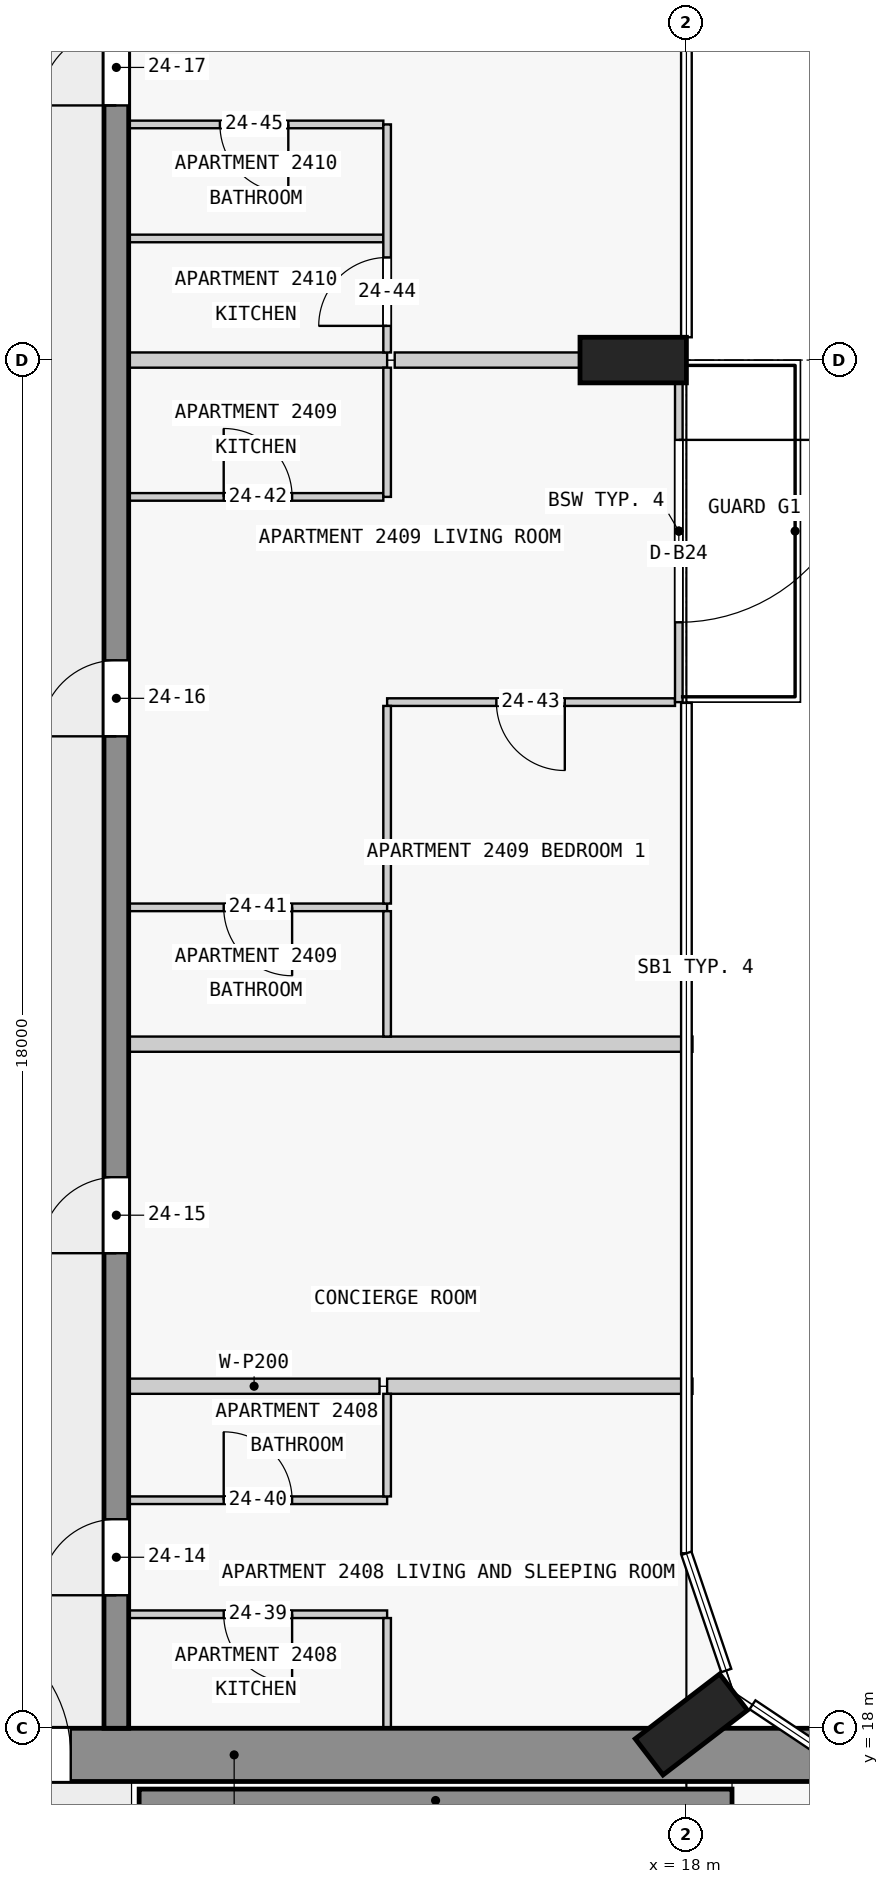
"""IFC4 building model, lengths in metres.
Left out: names, types, materials, properties, quantities, classifications, styles, units other than length and angle.
Written with IfcOpenShell. Run it as: python <this file> out.ifc"""

import sys

from ifc_helpers import new_model, si_unit, direction, frame, frame_2d, origin, origin_2d, place, context, subcontext, project, spatial, rectangle, extrude, element, fill, save


model = new_model("IFC4")
c1 = context("Model", 3, precision=1e-05, world=origin(), true_north=direction((0.0, 1.0)))
c2 = subcontext(c1, "Body", "Model", "MODEL_VIEW")
j1 = project(units=[si_unit("LENGTHUNIT", "METRE"), si_unit("PLANEANGLEUNIT", "RADIAN")], contexts=[c1])
p1 = place(None, origin())
s1 = spatial("IfcSite", under=j1, at=p1, CompositionType="ELEMENT")
p2 = place(p1, origin())
s2 = spatial("IfcBuilding", under=s1, at=p2, CompositionType="ELEMENT")
p3 = place(p2, frame((0.0, 0.0, 95.8)))
s3 = spatial("IfcBuildingStorey", under=s2, at=p3, CompositionType="ELEMENT", Elevation=95.8)
for number, where, z_axis, x_axis in (
    (1, (18.065, 18.05, 0.0), (0.0, 0.0, 1.0), (-0.609, 0.793, 0.0)),
    (2, (17.3, 36.0, 0.0), (0.0, 0.0, 1.0), (0.0, 1.0, 0.0)),
):
    element("IfcColumn", number, at=place(p3, frame(where, z_axis=z_axis, x_axis=x_axis)), inside=s3, PredefinedType="COLUMN", context=c2, shape_type="SweptSolid", body=[
        extrude(rectangle(XDim=0.6, YDim=1.4, at=origin_2d()), origin(), (0.0, 0.0, 1.0), 3.5),
    ])
p4 = place(p3, frame((1.6, 17.65, 0.0), z_axis=(0.0, 0.0, 1.0), x_axis=(1.0, 0.0, 0.0)))
e3 = element("IfcWall", 3, at=p4, inside=s3, PredefinedType="SHEAR", context=c2, shape_type="SweptSolid", body=[
    extrude(rectangle(XDim=20.9, YDim=0.7, at=frame_2d((10.45, 0.0))), origin(), (0.0, 0.0, 1.0), 3.25),
])
p5 = place(p4, frame((6.5, 0.0, 0.0)))
e4 = element("IfcOpeningElement", 4, at=p5, cuts=e3, PredefinedType="OPENING", context=c2, shape_type="SweptSolid", body=[
    extrude(rectangle(XDim=1.8, YDim=2.1, at=frame_2d((0.9, 1.05))), frame((0.0, 0.36, 0.0), z_axis=(0.0, -1.0, 0.0), x_axis=(1.0, 0.0, 0.0)), (0.0, 0.0, 1.0), 0.72),
])
p6 = place(p3, frame((10.8, 17.05, 0.0), z_axis=(0.0, 0.0, 1.0), x_axis=(1.0, 0.0, 0.0)))
e5 = element("IfcWall", 5, at=p6, inside=s3, PredefinedType="SHEAR", context=c2, shape_type="SweptSolid", body=[
    extrude(rectangle(XDim=7.8, YDim=0.3, at=frame_2d((3.9, 0.0))), origin(), (0.0, 0.0, 1.0), 3.25),
])
p7 = place(p3, frame((10.5, 18.0, 0.0), z_axis=(0.0, 0.0, 1.0), x_axis=(0.0, 1.0, 0.0)))
e6 = element("IfcWall", 6, at=p7, inside=s3, PredefinedType="SHEAR", context=c2, shape_type="SweptSolid", body=[
    extrude(rectangle(XDim=27.0, YDim=0.325, at=frame_2d((13.5, 0.0))), origin(), (0.0, 0.0, 1.0), 3.25),
])
p8 = place(p7, frame((1.75, 0.0, 0.0)))
e7 = element("IfcOpeningElement", 7, at=p8, cuts=e6, PredefinedType="OPENING", context=c2, shape_type="SweptSolid", body=[
    extrude(rectangle(XDim=1.0, YDim=2.1, at=frame_2d((0.5, 1.05))), frame((0.0, 0.172, 0.0), z_axis=(0.0, -1.0, 0.0), x_axis=(1.0, 0.0, 0.0)), (0.0, 0.0, 1.0), 0.345),
])
p9 = place(p7, frame((6.25, 0.0, 0.0)))
e8 = element("IfcOpeningElement", 8, at=p9, cuts=e6, PredefinedType="OPENING", context=c2, shape_type="SweptSolid", body=[
    extrude(rectangle(XDim=1.0, YDim=2.1, at=frame_2d((0.5, 1.05))), frame((0.0, 0.172, 0.0), z_axis=(0.0, -1.0, 0.0), x_axis=(1.0, 0.0, 0.0)), (0.0, 0.0, 1.0), 0.345),
])
p10 = place(p7, frame((13.05, 0.0, 0.0)))
e9 = element("IfcOpeningElement", 9, at=p10, cuts=e6, PredefinedType="OPENING", context=c2, shape_type="SweptSolid", body=[
    extrude(rectangle(XDim=1.0, YDim=2.1, at=frame_2d((0.5, 1.05))), frame((0.0, 0.172, 0.0), z_axis=(0.0, -1.0, 0.0), x_axis=(1.0, 0.0, 0.0)), (0.0, 0.0, 1.0), 0.345),
])
p11 = place(p7, frame((21.35, 0.0, 0.0)))
e10 = element("IfcOpeningElement", 10, at=p11, cuts=e6, PredefinedType="OPENING", context=c2, shape_type="SweptSolid", body=[
    extrude(rectangle(XDim=1.0, YDim=2.1, at=frame_2d((0.5, 1.05))), frame((0.0, 0.172, 0.0), z_axis=(0.0, -1.0, 0.0), x_axis=(1.0, 0.0, 0.0)), (0.0, 0.0, 1.0), 0.345),
])
p12 = place(p3, frame((17.9, 36.0, 0.0), z_axis=(0.0, 0.0, 1.0), x_axis=(0.0, -1.0, 0.0)))
e11 = element("IfcWall", 11, at=p12, inside=s3, PredefinedType="STANDARD", context=c2, shape_type="SweptSolid", body=[
    extrude(rectangle(XDim=4.5, YDim=0.1, at=frame_2d((2.25, 0.0))), origin(), (0.0, 0.0, 1.0), 3.25),
])
p13 = place(p12, frame((1.05, 0.0, 0.0)))
e12 = element("IfcOpeningElement", 12, at=p13, cuts=e11, PredefinedType="OPENING", context=c2, shape_type="SweptSolid", body=[
    extrude(rectangle(XDim=2.4, YDim=2.4, at=frame_2d((1.2, 1.2))), frame((0.0, 0.06, 0.0), z_axis=(0.0, -1.0, 0.0), x_axis=(1.0, 0.0, 0.0)), (0.0, 0.0, 1.0), 0.12),
])
p14 = place(p3, frame((14.062, 19.5, 0.0), z_axis=(0.0, 0.0, 1.0), x_axis=(-1.0, 0.0, 0.0)))
e13 = element("IfcWall", 13, at=p14, inside=s3, PredefinedType="PARTITIONING", context=c2, shape_type="SweptSolid", body=[
    extrude(rectangle(XDim=3.4, YDim=0.1, at=frame_2d((1.7, 0.0))), origin(), (0.0, 0.0, 1.0), 3.25),
])
p15 = place(p14, frame((1.25, 0.0, 0.0)))
e14 = element("IfcOpeningElement", 14, at=p15, cuts=e13, PredefinedType="OPENING", context=c2, shape_type="SweptSolid", body=[
    extrude(rectangle(XDim=0.9, YDim=2.1, at=frame_2d((0.45, 1.05))), frame((0.0, 0.06, 0.0), z_axis=(0.0, -1.0, 0.0), x_axis=(1.0, 0.0, 0.0)), (0.0, 0.0, 1.0), 0.12),
])
p16 = place(p3, frame((10.663, 21.0, 0.0), z_axis=(0.0, 0.0, 1.0), x_axis=(1.0, 0.0, 0.0)))
e15 = element("IfcWall", 15, at=p16, inside=s3, PredefinedType="PARTITIONING", context=c2, shape_type="SweptSolid", body=[
    extrude(rectangle(XDim=3.4, YDim=0.1, at=frame_2d((1.7, 0.0))), origin(), (0.0, 0.0, 1.0), 3.25),
])
p17 = place(p16, frame((1.25, 0.0, 0.0)))
e16 = element("IfcOpeningElement", 16, at=p17, cuts=e15, PredefinedType="OPENING", context=c2, shape_type="SweptSolid", body=[
    extrude(rectangle(XDim=0.9, YDim=2.1, at=frame_2d((0.45, 1.05))), frame((0.0, 0.06, 0.0), z_axis=(0.0, -1.0, 0.0), x_axis=(1.0, 0.0, 0.0)), (0.0, 0.0, 1.0), 0.12),
])
p18 = place(p3, frame((13.962, 22.5, 0.0), z_axis=(0.0, 0.0, 1.0), x_axis=(-1.0, 0.0, 0.0)))
e17 = element("IfcWall", 17, at=p18, inside=s3, PredefinedType="PARTITIONING", context=c2, shape_type="SweptSolid", body=[
    extrude(rectangle(XDim=3.3, YDim=0.2, at=frame_2d((1.65, 0.0))), origin(), (0.0, 0.0, 1.0), 3.25),
])
p19 = place(p3, frame((14.062, 22.5, 0.0), z_axis=(0.0, 0.0, 1.0), x_axis=(1.0, 0.0, 0.0)))
e18 = element("IfcWall", 18, at=p19, inside=s3, PredefinedType="PARTITIONING", context=c2, shape_type="SweptSolid", body=[
    extrude(rectangle(XDim=4.018, YDim=0.2, at=frame_2d((2.009, 0.0))), origin(), (0.0, 0.0, 1.0), 3.25),
])
p20 = place(p3, frame((18.08, 27.0, 0.0), z_axis=(0.0, 0.0, 1.0), x_axis=(-1.0, 0.0, 0.0)))
e19 = element("IfcWall", 19, at=p20, inside=s3, PredefinedType="PARTITIONING", context=c2, shape_type="SweptSolid", body=[
    extrude(rectangle(XDim=7.417, YDim=0.2, at=frame_2d((3.709, 0.0))), origin(), (0.0, 0.0, 1.0), 3.25),
])
p21 = place(p3, frame((14.062, 28.8, 0.0), z_axis=(0.0, 0.0, 1.0), x_axis=(-1.0, 0.0, 0.0)))
e20 = element("IfcWall", 20, at=p21, inside=s3, PredefinedType="PARTITIONING", context=c2, shape_type="SweptSolid", body=[
    extrude(rectangle(XDim=3.4, YDim=0.1, at=frame_2d((1.7, 0.0))), origin(), (0.0, 0.0, 1.0), 3.25),
])
p22 = place(p21, frame((1.25, 0.0, 0.0)))
e21 = element("IfcOpeningElement", 21, at=p22, cuts=e20, PredefinedType="OPENING", context=c2, shape_type="SweptSolid", body=[
    extrude(rectangle(XDim=0.9, YDim=2.1, at=frame_2d((0.45, 1.05))), frame((0.0, 0.06, 0.0), z_axis=(0.0, -1.0, 0.0), x_axis=(1.0, 0.0, 0.0)), (0.0, 0.0, 1.0), 0.12),
])
p23 = place(p3, frame((17.85, 31.5, 0.0), z_axis=(0.0, 0.0, 1.0), x_axis=(-1.0, 0.0, 0.0)))
e22 = element("IfcWall", 22, at=p23, inside=s3, PredefinedType="PARTITIONING", context=c2, shape_type="SweptSolid", body=[
    extrude(rectangle(XDim=3.788, YDim=0.1, at=frame_2d((1.894, 0.0))), origin(), (0.0, 0.0, 1.0), 3.25),
])
p24 = place(p23, frame((1.45, 0.0, 0.0)))
e23 = element("IfcOpeningElement", 23, at=p24, cuts=e22, PredefinedType="OPENING", context=c2, shape_type="SweptSolid", body=[
    extrude(rectangle(XDim=0.9, YDim=2.1, at=frame_2d((0.45, 1.05))), frame((0.0, 0.06, 0.0), z_axis=(0.0, -1.0, 0.0), x_axis=(1.0, 0.0, 0.0)), (0.0, 0.0, 1.0), 0.12),
])
p25 = place(p3, frame((10.663, 34.2, 0.0), z_axis=(0.0, 0.0, 1.0), x_axis=(1.0, 0.0, 0.0)))
e24 = element("IfcWall", 24, at=p25, inside=s3, PredefinedType="PARTITIONING", context=c2, shape_type="SweptSolid", body=[
    extrude(rectangle(XDim=3.35, YDim=0.1, at=frame_2d((1.675, 0.0))), origin(), (0.0, 0.0, 1.0), 3.25),
])
p26 = place(p25, frame((1.25, 0.0, 0.0)))
e25 = element("IfcOpeningElement", 25, at=p26, cuts=e24, PredefinedType="OPENING", context=c2, shape_type="SweptSolid", body=[
    extrude(rectangle(XDim=0.9, YDim=2.1, at=frame_2d((0.45, 1.05))), frame((0.0, 0.06, 0.0), z_axis=(0.0, -1.0, 0.0), x_axis=(1.0, 0.0, 0.0)), (0.0, 0.0, 1.0), 0.12),
])
p27 = place(p3, frame((14.062, 36.0, 0.0), z_axis=(0.0, 0.0, 1.0), x_axis=(-1.0, 0.0, 0.0)))
e26 = element("IfcWall", 26, at=p27, inside=s3, PredefinedType="PARTITIONING", context=c2, shape_type="SweptSolid", body=[
    extrude(rectangle(XDim=3.4, YDim=0.2, at=frame_2d((1.7, 0.0))), origin(), (0.0, 0.0, 1.0), 3.25),
])
p28 = place(p3, frame((14.163, 36.0, 0.0), z_axis=(0.0, 0.0, 1.0), x_axis=(1.0, 0.0, 0.0)))
e27 = element("IfcWall", 27, at=p28, inside=s3, PredefinedType="PARTITIONING", context=c2, shape_type="SweptSolid", body=[
    extrude(rectangle(XDim=2.438, YDim=0.2, at=frame_2d((1.219, 0.0))), origin(), (0.0, 0.0, 1.0), 3.25),
])
p29 = place(p3, frame((14.012, 37.6, 0.0), z_axis=(0.0, 0.0, 1.0), x_axis=(-1.0, 0.0, 0.0)))
e28 = element("IfcWall", 28, at=p29, inside=s3, PredefinedType="PARTITIONING", context=c2, shape_type="SweptSolid", body=[
    extrude(rectangle(XDim=3.35, YDim=0.1, at=frame_2d((1.675, 0.0))), origin(), (0.0, 0.0, 1.0), 3.25),
])
p30 = place(p3, frame((14.012, 39.1, 0.0), z_axis=(0.0, 0.0, 1.0), x_axis=(-1.0, 0.0, 0.0)))
e29 = element("IfcWall", 29, at=p30, inside=s3, PredefinedType="PARTITIONING", context=c2, shape_type="SweptSolid", body=[
    extrude(rectangle(XDim=3.35, YDim=0.1, at=frame_2d((1.675, 0.0))), origin(), (0.0, 0.0, 1.0), 3.25),
])
p31 = place(p30, frame((1.25, 0.0, 0.0)))
e30 = element("IfcOpeningElement", 30, at=p31, cuts=e29, PredefinedType="OPENING", context=c2, shape_type="SweptSolid", body=[
    extrude(rectangle(XDim=0.9, YDim=2.1, at=frame_2d((0.45, 1.05))), frame((0.0, 0.06, 0.0), z_axis=(0.0, -1.0, 0.0), x_axis=(1.0, 0.0, 0.0)), (0.0, 0.0, 1.0), 0.12),
])
p32 = place(p3, frame((14.062, 31.45, 0.0), z_axis=(0.0, 0.0, 1.0), x_axis=(0.0, -1.0, 0.0)))
e31 = element("IfcWall", 31, at=p32, inside=s3, PredefinedType="PARTITIONING", context=c2, shape_type="SweptSolid", body=[
    extrude(rectangle(XDim=2.6, YDim=0.1, at=frame_2d((1.3, 0.0))), origin(), (0.0, 0.0, 1.0), 3.25),
])
p33 = place(p3, frame((14.062, 18.0, 0.0), z_axis=(0.0, 0.0, 1.0), x_axis=(0.0, 1.0, 0.0)))
e32 = element("IfcWall", 32, at=p33, inside=s3, PredefinedType="PARTITIONING", context=c2, shape_type="SweptSolid", body=[
    extrude(rectangle(XDim=1.45, YDim=0.1, at=frame_2d((0.725, 0.0))), origin(), (0.0, 0.0, 1.0), 3.25),
])
p34 = place(p3, frame((14.062, 21.05, 0.0), z_axis=(0.0, 0.0, 1.0), x_axis=(0.0, 1.0, 0.0)))
e33 = element("IfcWall", 33, at=p34, inside=s3, PredefinedType="PARTITIONING", context=c2, shape_type="SweptSolid", body=[
    extrude(rectangle(XDim=1.35, YDim=0.1, at=frame_2d((0.675, 0.0))), origin(), (0.0, 0.0, 1.0), 3.25),
])
p35 = place(p3, frame((14.062, 27.1, 0.0), z_axis=(0.0, 0.0, 1.0), x_axis=(0.0, 1.0, 0.0)))
e34 = element("IfcWall", 34, at=p35, inside=s3, PredefinedType="PARTITIONING", context=c2, shape_type="SweptSolid", body=[
    extrude(rectangle(XDim=1.65, YDim=0.1, at=frame_2d((0.825, 0.0))), origin(), (0.0, 0.0, 1.0), 3.25),
])
p36 = place(p3, frame((14.062, 34.2, 0.0), z_axis=(0.0, 0.0, 1.0), x_axis=(0.0, 1.0, 0.0)))
e35 = element("IfcWall", 35, at=p36, inside=s3, PredefinedType="PARTITIONING", context=c2, shape_type="SweptSolid", body=[
    extrude(rectangle(XDim=1.7, YDim=0.1, at=frame_2d((0.85, 0.0))), origin(), (0.0, 0.0, 1.0), 3.25),
])
p37 = place(p3, frame((14.062, 36.1, 0.0), z_axis=(0.0, 0.0, 1.0), x_axis=(0.0, 1.0, 0.0)))
e36 = element("IfcWall", 36, at=p37, inside=s3, PredefinedType="PARTITIONING", context=c2, shape_type="SweptSolid", body=[
    extrude(rectangle(XDim=3.0, YDim=0.1, at=frame_2d((1.5, 0.0))), origin(), (0.0, 0.0, 1.0), 3.25),
])
p38 = place(p37, frame((0.35, 0.0, 0.0)))
e37 = element("IfcOpeningElement", 37, at=p38, cuts=e36, PredefinedType="OPENING", context=c2, shape_type="SweptSolid", body=[
    extrude(rectangle(XDim=0.9, YDim=2.1, at=frame_2d((0.45, 1.05))), frame((0.0, 0.06, 0.0), z_axis=(0.0, -1.0, 0.0), x_axis=(1.0, 0.0, 0.0)), (0.0, 0.0, 1.0), 0.12),
])
p39 = place(p13, origin())
e38 = element("IfcDoor", 38, at=p39, inside=s3, OperationType="SINGLE_SWING_LEFT", PredefinedType="DOOR", context=c2, shape_type="SweptSolid", body=[
    extrude(rectangle(XDim=2.4, YDim=2.4, at=frame_2d((1.2, 1.2))), frame((0.0, 0.025, 0.0), z_axis=(0.0, -1.0, 0.0), x_axis=(1.0, 0.0, 0.0)), (0.0, 0.0, 1.0), 0.05),
])
fill(e12, e38)
p40 = place(p5, origin())
e39 = element("IfcDoor", 39, at=p40, inside=s3, OperationType="DOUBLE_DOOR_SINGLE_SWING", PredefinedType="DOOR", context=c2, shape_type="SweptSolid", body=[
    extrude(rectangle(XDim=1.8, YDim=2.1, at=frame_2d((0.9, 1.05))), frame((0.0, 0.025, 0.0), z_axis=(0.0, -1.0, 0.0), x_axis=(1.0, 0.0, 0.0)), (0.0, 0.0, 1.0), 0.05),
])
fill(e4, e39)
p41 = place(p8, origin())
e40 = element("IfcDoor", 40, at=p41, inside=s3, OperationType="SINGLE_SWING_LEFT", PredefinedType="DOOR", context=c2, shape_type="SweptSolid", body=[
    extrude(rectangle(XDim=1.0, YDim=2.1, at=frame_2d((0.5, 1.05))), frame((0.0, 0.025, 0.0), z_axis=(0.0, -1.0, 0.0), x_axis=(1.0, 0.0, 0.0)), (0.0, 0.0, 1.0), 0.05),
])
fill(e7, e40)
p42 = place(p9, origin())
e41 = element("IfcDoor", 41, at=p42, inside=s3, OperationType="SINGLE_SWING_LEFT", PredefinedType="DOOR", context=c2, shape_type="SweptSolid", body=[
    extrude(rectangle(XDim=1.0, YDim=2.1, at=frame_2d((0.5, 1.05))), frame((0.0, 0.025, 0.0), z_axis=(0.0, -1.0, 0.0), x_axis=(1.0, 0.0, 0.0)), (0.0, 0.0, 1.0), 0.05),
])
fill(e8, e41)
p43 = place(p10, origin())
e42 = element("IfcDoor", 42, at=p43, inside=s3, OperationType="SINGLE_SWING_RIGHT", PredefinedType="DOOR", context=c2, shape_type="SweptSolid", body=[
    extrude(rectangle(XDim=1.0, YDim=2.1, at=frame_2d((0.5, 1.05))), frame((0.0, 0.025, 0.0), z_axis=(0.0, -1.0, 0.0), x_axis=(1.0, 0.0, 0.0)), (0.0, 0.0, 1.0), 0.05),
])
fill(e9, e42)
p44 = place(p11, origin())
e43 = element("IfcDoor", 43, at=p44, inside=s3, OperationType="SINGLE_SWING_RIGHT", PredefinedType="DOOR", context=c2, shape_type="SweptSolid", body=[
    extrude(rectangle(XDim=1.0, YDim=2.1, at=frame_2d((0.5, 1.05))), frame((0.0, 0.025, 0.0), z_axis=(0.0, -1.0, 0.0), x_axis=(1.0, 0.0, 0.0)), (0.0, 0.0, 1.0), 0.05),
])
fill(e10, e43)
p45 = place(p15, origin())
e44 = element("IfcDoor", 44, at=p45, inside=s3, OperationType="SINGLE_SWING_LEFT", PredefinedType="DOOR", context=c2, shape_type="SweptSolid", body=[
    extrude(rectangle(XDim=0.9, YDim=2.1, at=frame_2d((0.45, 1.05))), frame((0.0, 0.025, 0.0), z_axis=(0.0, -1.0, 0.0), x_axis=(1.0, 0.0, 0.0)), (0.0, 0.0, 1.0), 0.05),
])
fill(e14, e44)
p46 = place(p17, origin())
e45 = element("IfcDoor", 45, at=p46, inside=s3, OperationType="SINGLE_SWING_LEFT", PredefinedType="DOOR", context=c2, shape_type="SweptSolid", body=[
    extrude(rectangle(XDim=0.9, YDim=2.1, at=frame_2d((0.45, 1.05))), frame((0.0, 0.025, 0.0), z_axis=(0.0, -1.0, 0.0), x_axis=(1.0, 0.0, 0.0)), (0.0, 0.0, 1.0), 0.05),
])
fill(e16, e45)
p47 = place(p22, origin())
e46 = element("IfcDoor", 46, at=p47, inside=s3, OperationType="SINGLE_SWING_LEFT", PredefinedType="DOOR", context=c2, shape_type="SweptSolid", body=[
    extrude(rectangle(XDim=0.9, YDim=2.1, at=frame_2d((0.45, 1.05))), frame((0.0, 0.025, 0.0), z_axis=(0.0, -1.0, 0.0), x_axis=(1.0, 0.0, 0.0)), (0.0, 0.0, 1.0), 0.05),
])
fill(e21, e46)
p48 = place(p26, origin())
e47 = element("IfcDoor", 47, at=p48, inside=s3, OperationType="SINGLE_SWING_RIGHT", PredefinedType="DOOR", context=c2, shape_type="SweptSolid", body=[
    extrude(rectangle(XDim=0.9, YDim=2.1, at=frame_2d((0.45, 1.05))), frame((0.0, 0.025, 0.0), z_axis=(0.0, -1.0, 0.0), x_axis=(1.0, 0.0, 0.0)), (0.0, 0.0, 1.0), 0.05),
])
fill(e25, e47)
p49 = place(p24, origin())
e48 = element("IfcDoor", 48, at=p49, inside=s3, OperationType="SINGLE_SWING_RIGHT", PredefinedType="DOOR", context=c2, shape_type="SweptSolid", body=[
    extrude(rectangle(XDim=0.9, YDim=2.1, at=frame_2d((0.45, 1.05))), frame((0.0, 0.025, 0.0), z_axis=(0.0, -1.0, 0.0), x_axis=(1.0, 0.0, 0.0)), (0.0, 0.0, 1.0), 0.05),
])
fill(e23, e48)
p50 = place(p38, origin())
e49 = element("IfcDoor", 49, at=p50, inside=s3, OperationType="SINGLE_SWING_LEFT", PredefinedType="DOOR", context=c2, shape_type="SweptSolid", body=[
    extrude(rectangle(XDim=0.9, YDim=2.1, at=frame_2d((0.45, 1.05))), frame((0.0, 0.025, 0.0), z_axis=(0.0, -1.0, 0.0), x_axis=(1.0, 0.0, 0.0)), (0.0, 0.0, 1.0), 0.05),
])
fill(e37, e49)
p51 = place(p31, origin())
e50 = element("IfcDoor", 50, at=p51, inside=s3, OperationType="SINGLE_SWING_RIGHT", PredefinedType="DOOR", context=c2, shape_type="SweptSolid", body=[
    extrude(rectangle(XDim=0.9, YDim=2.1, at=frame_2d((0.45, 1.05))), frame((0.0, 0.025, 0.0), z_axis=(0.0, -1.0, 0.0), x_axis=(1.0, 0.0, 0.0)), (0.0, 0.0, 1.0), 0.05),
])
fill(e30, e50)
save(model, sys.argv[1])
